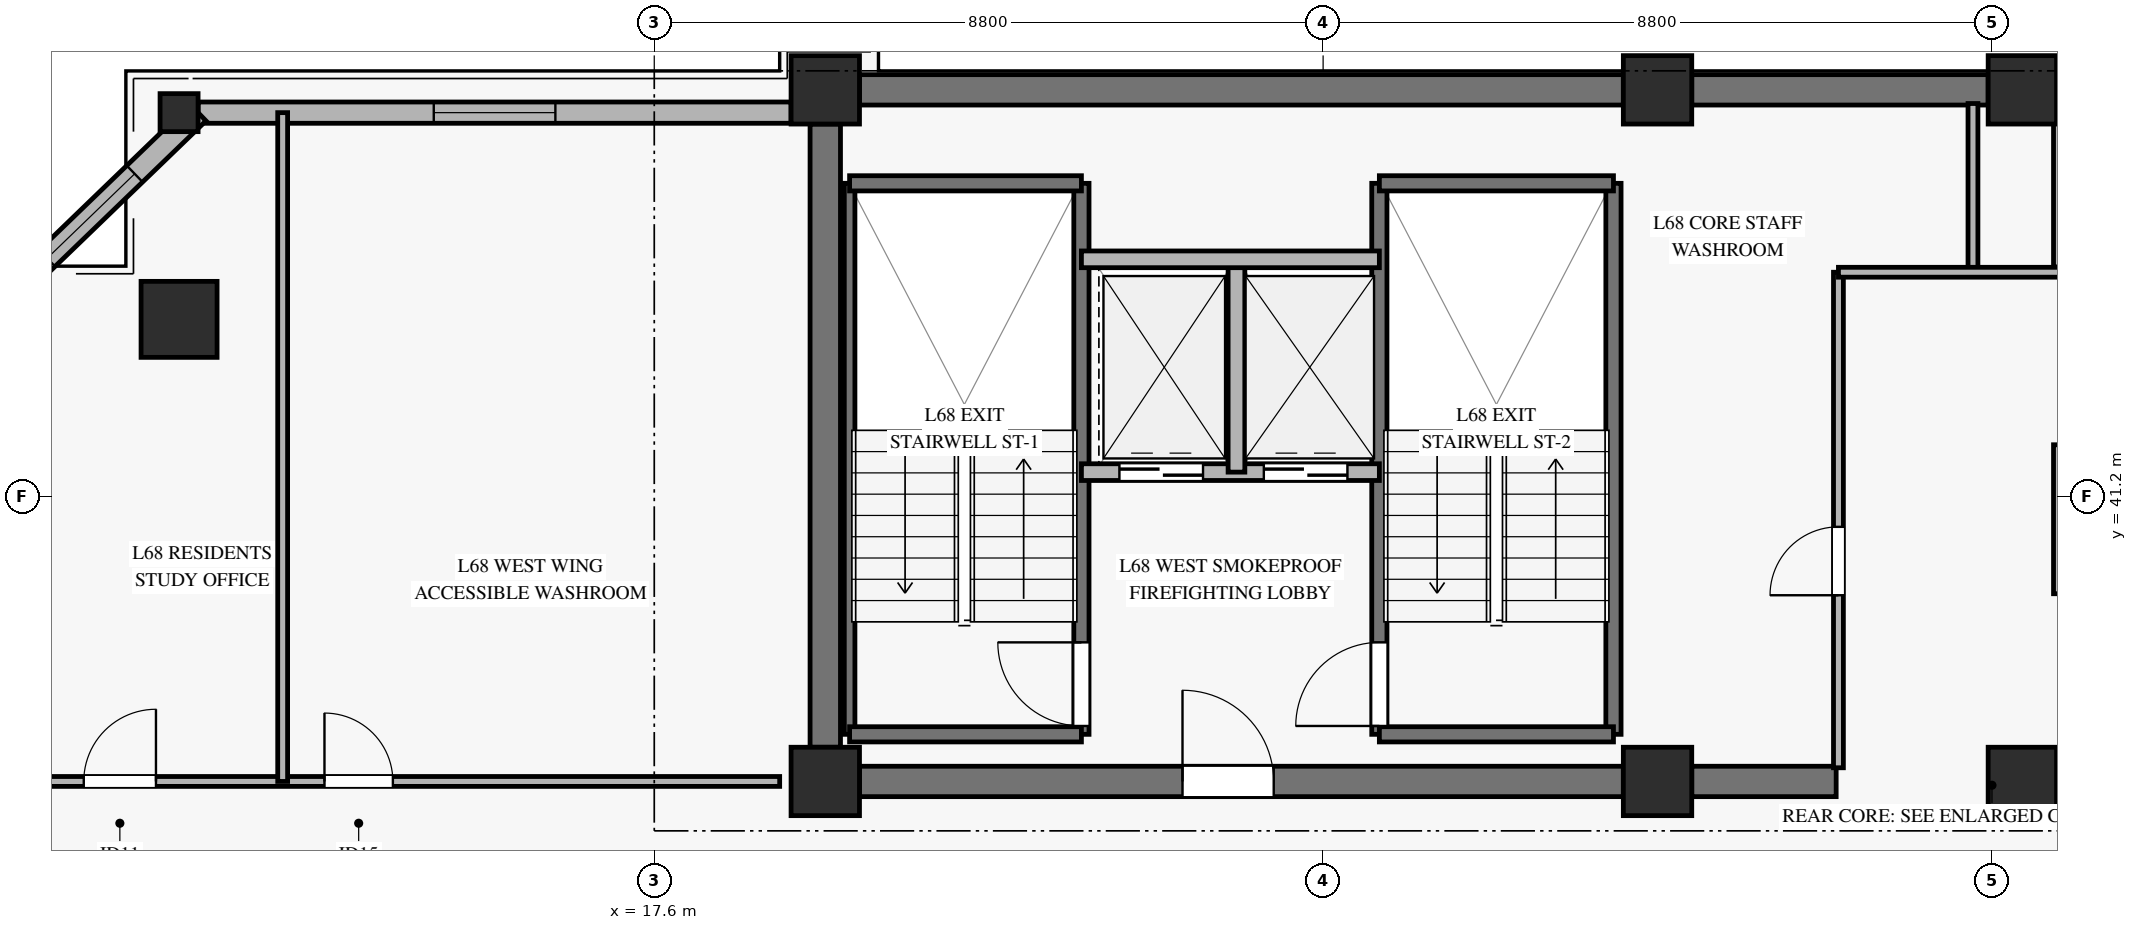
"""IFC4 building model, lengths in metres.
Left out: names, types, materials, properties, quantities, classifications, styles, units other than length and angle.
Written with IfcOpenShell. Run it as: python <this file> out.ifc"""

import sys

from ifc_helpers import new_model, si_unit, direction, frame, frame_2d, origin, origin_2d, place, context, subcontext, project, spatial, rectangle, hollow_rectangle, extrude, source, transform, mapped, element, fill, save


model = new_model("IFC4")
c1 = context("Model", 3, precision=1e-05, world=origin(), true_north=direction((0.0, 1.0)))
c2 = subcontext(c1, "Body", "Model", "MODEL_VIEW")
j1 = project(units=[si_unit("LENGTHUNIT", "METRE"), si_unit("PLANEANGLEUNIT", "RADIAN")], contexts=[c1])
p1 = place(None, origin())
s1 = spatial("IfcSite", under=j1, at=p1, CompositionType="ELEMENT")
p2 = place(p1, origin())
s2 = spatial("IfcBuilding", under=s1, at=p2, CompositionType="ELEMENT")
p3 = place(p2, frame((0.0, 0.0, 265.5)))
s3 = spatial("IfcBuildingStorey", under=s2, at=p3, CompositionType="ELEMENT", Elevation=265.5)
m1 = source(origin(), c2, "Body", "SweptSolid", [
    extrude(rectangle(XDim=0.9, YDim=0.9, at=origin_2d()), origin(), (0.0, 0.0, 1.0), 3.185),
])
for number, where, z_axis, x_axis in (
    (1, (19.85, 37.45, 0.0), (0.0, 0.0, 1.0), (1.0, 0.0, 0.0)),
    (2, (19.85, 46.55, 0.0), (0.0, 0.0, 1.0), (1.0, 0.0, 0.0)),
    (3, (30.8, 37.45, 0.0), (0.0, 0.0, 1.0), (1.0, 0.0, 0.0)),
    (4, (30.8, 46.55, 0.0), (0.0, 0.0, 1.0), (1.0, 0.0, 0.0)),
    (5, (35.6, 37.45, 0.0), (0.0, 0.0, 1.0), (1.0, 0.0, 0.0)),
    (6, (35.6, 46.55, 0.0), (0.0, 0.0, 1.0), (1.0, 0.0, 0.0)),
):
    element("IfcColumn", number, at=place(p3, frame(where, z_axis=z_axis, x_axis=x_axis)), inside=s3, PredefinedType="PILASTER", context=c2, shape_type="MappedRepresentation", body=[
        mapped(m1, transform((0.0, 0.0, 0.0), x_axis=(1.0, 0.0, 0.0), y_axis=(0.0, 1.0, 0.0), z_axis=(0.0, 0.0, 1.0), scale=1.0)),
    ])
p4 = place(p3, frame((20.3, 46.55, 0.0), z_axis=(0.0, 0.0, 1.0), x_axis=(1.0, 0.0, 0.0)))
e7 = element("IfcWall", 7, at=p4, inside=s3, PredefinedType="SHEAR", context=c2, shape_type="SweptSolid", body=[
    extrude(rectangle(XDim=10.05, YDim=0.4, at=frame_2d((5.025, 0.0))), origin(), (0.0, 0.0, 1.0), 3.185),
])
p5 = place(p3, frame((31.25, 46.55, 0.0), z_axis=(0.0, 0.0, 1.0), x_axis=(1.0, 0.0, 0.0)))
e8 = element("IfcWall", 8, at=p5, inside=s3, PredefinedType="SHEAR", context=c2, shape_type="SweptSolid", body=[
    extrude(rectangle(XDim=3.9, YDim=0.4, at=frame_2d((1.95, 0.0))), origin(), (0.0, 0.0, 1.0), 3.185),
])
p6 = place(p3, frame((36.05, 46.55, 0.0), z_axis=(0.0, 0.0, 1.0), x_axis=(1.0, 0.0, 0.0)))
e9 = element("IfcWall", 9, at=p6, inside=s3, PredefinedType="SHEAR", context=c2, shape_type="SweptSolid", body=[
    extrude(rectangle(XDim=7.8, YDim=0.4, at=frame_2d((3.9, 0.0))), origin(), (0.0, 0.0, 1.0), 3.185),
])
p7 = place(p3, frame((20.3, 37.45, 0.0), z_axis=(0.0, 0.0, 1.0), x_axis=(1.0, 0.0, 0.0)))
e10 = element("IfcWall", 10, at=p7, inside=s3, PredefinedType="SHEAR", context=c2, shape_type="SweptSolid", body=[
    extrude(rectangle(XDim=10.05, YDim=0.4, at=frame_2d((5.025, 0.0))), origin(), (0.0, 0.0, 1.0), 3.185),
])
p8 = place(p7, frame((4.25, 0.0, 0.0)))
e11 = element("IfcOpeningElement", 11, at=p8, cuts=e10, PredefinedType="OPENING", context=c2, shape_type="SweptSolid", body=[
    extrude(rectangle(XDim=1.2, YDim=2.15, at=frame_2d((0.6, 1.075))), frame((0.0, 0.21, 0.0), z_axis=(0.0, -1.0, 0.0), x_axis=(1.0, 0.0, 0.0)), (0.0, 0.0, 1.0), 0.42),
])
p9 = place(p3, frame((31.25, 37.45, 0.0), z_axis=(0.0, 0.0, 1.0), x_axis=(1.0, 0.0, 0.0)))
e12 = element("IfcWall", 12, at=p9, inside=s3, PredefinedType="SHEAR", context=c2, shape_type="SweptSolid", body=[
    extrude(rectangle(XDim=1.9, YDim=0.4, at=frame_2d((0.95, 0.0))), origin(), (0.0, 0.0, 1.0), 3.185),
])
p10 = place(p3, frame((36.05, 37.45, 0.0), z_axis=(0.0, 0.0, 1.0), x_axis=(1.0, 0.0, 0.0)))
e13 = element("IfcWall", 13, at=p10, inside=s3, PredefinedType="SHEAR", context=c2, shape_type="SweptSolid", body=[
    extrude(rectangle(XDim=7.8, YDim=0.4, at=frame_2d((3.9, 0.0))), origin(), (0.0, 0.0, 1.0), 3.185),
])
p11 = place(p3, frame((19.85, 37.9, 0.0), z_axis=(0.0, 0.0, 1.0), x_axis=(0.0, 1.0, 0.0)))
e14 = element("IfcWall", 14, at=p11, inside=s3, PredefinedType="SHEAR", context=c2, shape_type="SweptSolid", body=[
    extrude(rectangle(XDim=8.2, YDim=0.4, at=frame_2d((4.1, 0.0))), origin(), (0.0, 0.0, 1.0), 3.185),
])
m2 = source(origin(), c2, "Body", "SweptSolid", [
    extrude(hollow_rectangle(XDim=1.0, YDim=1.0, WallThickness=0.045, at=origin_2d()), origin(), (0.0, 0.0, 1.0), 3.207),
])
p12 = place(p3, frame((11.348, 43.53, 0.0), z_axis=(0.115114664391, 0.014617735161, 0.993244650557), x_axis=(-0.125972537044, 0.99203372922, 0.0)))
e15 = element("IfcColumn", 15, at=p12, inside=s3, PredefinedType="COLUMN", context=c2, shape_type="MappedRepresentation", body=[
    mapped(m2, transform((0.0, 0.0, 0.0), x_axis=(1.0, 0.0, 0.0), y_axis=(0.0, 1.0, 0.0), z_axis=(0.0, 0.0, 1.0), scale=1.0)),
])
m3 = source(origin(), c2, "Body", "SweptSolid", [
    extrude(hollow_rectangle(XDim=0.5, YDim=0.5, WallThickness=0.024, at=origin_2d()), origin(), (0.0, 0.0, 1.0), 3.206),
])
p13 = place(p3, frame((11.348, 46.25, 0.0), z_axis=(0.115126965108, 0.0, 0.993350784922), x_axis=(0.0, 1.0, 0.0)))
e16 = element("IfcColumn", 16, at=p13, inside=s3, PredefinedType="COLUMN", context=c2, shape_type="MappedRepresentation", body=[
    mapped(m3, transform((0.0, 0.0, 0.0), x_axis=(1.0, 0.0, 0.0), y_axis=(0.0, 1.0, 0.0), z_axis=(0.0, 0.0, 1.0), scale=1.0)),
])
p14 = place(p3, frame((11.598, 46.25, 0.0), z_axis=(0.0, 0.0, 1.0), x_axis=(1.0, 0.0, 0.0)))
e17 = element("IfcWall", 17, at=p14, inside=s3, PredefinedType="SOLIDWALL", context=c2, shape_type="SweptSolid", body=[
    extrude(rectangle(XDim=7.802, YDim=0.28, at=frame_2d((3.901, 0.0))), origin(), (0.0, 0.0, 1.0), 2.815),
])
p15 = place(p14, frame((3.101, 0.0, 0.45)))
e18 = element("IfcOpeningElement", 18, at=p15, cuts=e17, PredefinedType="OPENING", context=c2, shape_type="SweptSolid", body=[
    extrude(rectangle(XDim=1.6, YDim=2.0, at=frame_2d((0.8, 1.0))), frame((0.0, 0.15, 0.0), z_axis=(0.0, -1.0, 0.0), x_axis=(1.0, 0.0, 0.0)), (0.0, 0.0, 1.0), 0.3),
])
p16 = place(p3, frame((11.598, 46.25, 0.0), z_axis=(0.0, 0.0, 1.0), x_axis=(-0.719615137371, -0.694373137489, 0.0)))
e19 = element("IfcWall", 19, at=p16, inside=s3, PredefinedType="SOLIDWALL", context=c2, shape_type="SweptSolid", body=[
    extrude(rectangle(XDim=3.917, YDim=0.3, at=frame_2d((1.958, 0.0))), origin(), (0.0, 0.0, 1.0), 2.815),
])
p17 = place(p16, frame((1.159, 0.0, 0.45)))
e20 = element("IfcOpeningElement", 20, at=p17, cuts=e19, PredefinedType="OPENING", context=c2, shape_type="SweptSolid", body=[
    extrude(rectangle(XDim=1.6, YDim=2.0, at=frame_2d((0.8, 1.0))), frame((0.0, 0.16, 0.0), z_axis=(0.0, -1.0, 0.0), x_axis=(1.0, 0.0, 0.0)), (0.0, 0.0, 1.0), 0.32),
])
p18 = place(p3, frame((20.17, 38.07, 0.0), z_axis=(0.0, 0.0, 1.0), x_axis=(0.0, 1.0, 0.0)))
e21 = element("IfcWall", 21, at=p18, inside=s3, PredefinedType="SOLIDWALL", context=c2, shape_type="SweptSolid", body=[
    extrude(rectangle(XDim=7.25, YDim=0.14, at=frame_2d((3.625, 0.0))), origin(), (0.0, 0.0, 1.0), 3.4),
])
p19 = place(p3, frame((23.22, 38.07, 0.0), z_axis=(0.0, 0.0, 1.0), x_axis=(0.0, 1.0, 0.0)))
e22 = element("IfcWall", 22, at=p19, inside=s3, PredefinedType="SOLIDWALL", context=c2, shape_type="SweptSolid", body=[
    extrude(rectangle(XDim=7.25, YDim=0.2, at=frame_2d((3.625, 0.0))), origin(), (0.0, 0.0, 1.0), 3.4),
])
p20 = place(p19, frame((0.11, 0.0, 0.0)))
e23 = element("IfcOpeningElement", 23, at=p20, cuts=e22, PredefinedType="OPENING", context=c2, shape_type="SweptSolid", body=[
    extrude(rectangle(XDim=1.1, YDim=2.15, at=frame_2d((0.55, 1.075))), frame((0.0, 0.11, 0.0), z_axis=(0.0, -1.0, 0.0), x_axis=(1.0, 0.0, 0.0)), (0.0, 0.0, 1.0), 0.22),
])
for number, where, z_axis, x_axis in (
    (24, (20.17, 45.32, 0.0), (0.0, 0.0, 1.0), (1.0, 0.0, 0.0)),
    (25, (20.17, 38.07, 0.0), (0.0, 0.0, 1.0), (1.0, 0.0, 0.0)),
):
    element("IfcWall", number, at=place(p3, frame(where, z_axis=z_axis, x_axis=x_axis)), inside=s3, PredefinedType="SOLIDWALL", context=c2, shape_type="SweptSolid", body=[
        extrude(rectangle(XDim=3.05, YDim=0.2, at=frame_2d((1.525, 0.0))), origin(), (0.0, 0.0, 1.0), 3.4),
    ])
p21 = place(p3, frame((27.14, 38.07, 0.0), z_axis=(0.0, 0.0, 1.0), x_axis=(0.0, 1.0, 0.0)))
e26 = element("IfcWall", 26, at=p21, inside=s3, PredefinedType="SOLIDWALL", context=c2, shape_type="SweptSolid", body=[
    extrude(rectangle(XDim=7.25, YDim=0.2, at=frame_2d((3.625, 0.0))), origin(), (0.0, 0.0, 1.0), 3.4),
])
p22 = place(p21, frame((0.11, 0.0, 0.0)))
e27 = element("IfcOpeningElement", 27, at=p22, cuts=e26, PredefinedType="OPENING", context=c2, shape_type="SweptSolid", body=[
    extrude(rectangle(XDim=1.1, YDim=2.15, at=frame_2d((0.55, 1.075))), frame((0.0, 0.11, 0.0), z_axis=(0.0, -1.0, 0.0), x_axis=(1.0, 0.0, 0.0)), (0.0, 0.0, 1.0), 0.22),
])
p23 = place(p3, frame((30.22, 38.07, 0.0), z_axis=(0.0, 0.0, 1.0), x_axis=(0.0, 1.0, 0.0)))
e28 = element("IfcWall", 28, at=p23, inside=s3, PredefinedType="SOLIDWALL", context=c2, shape_type="SweptSolid", body=[
    extrude(rectangle(XDim=7.25, YDim=0.2, at=frame_2d((3.625, 0.0))), origin(), (0.0, 0.0, 1.0), 3.4),
])
for number, where, z_axis, x_axis in (
    (29, (27.14, 45.32, 0.0), (0.0, 0.0, 1.0), (1.0, 0.0, 0.0)),
    (30, (27.14, 38.07, 0.0), (0.0, 0.0, 1.0), (1.0, 0.0, 0.0)),
):
    element("IfcWall", number, at=place(p3, frame(where, z_axis=z_axis, x_axis=x_axis)), inside=s3, PredefinedType="SOLIDWALL", context=c2, shape_type="SweptSolid", body=[
        extrude(rectangle(XDim=3.08, YDim=0.2, at=frame_2d((1.54, 0.0))), origin(), (0.0, 0.0, 1.0), 3.4),
    ])
p24 = place(p3, frame((23.22, 41.52, 0.0), z_axis=(0.0, 0.0, 1.0), x_axis=(1.0, 0.0, 0.0)))
e31 = element("IfcWall", 31, at=p24, inside=s3, PredefinedType="SOLIDWALL", context=c2, shape_type="SweptSolid", body=[
    extrude(rectangle(XDim=3.92, YDim=0.22, at=frame_2d((1.96, 0.0))), origin(), (0.0, 0.0, 1.0), 3.185),
])
p25 = place(p24, frame((0.5, 0.0, 0.0)))
e32 = element("IfcOpeningElement", 32, at=p25, cuts=e31, PredefinedType="OPENING", context=c2, shape_type="SweptSolid", body=[
    extrude(rectangle(XDim=1.1, YDim=2.2, at=frame_2d((0.55, 1.1))), frame((0.0, 0.12, 0.0), z_axis=(0.0, -1.0, 0.0), x_axis=(1.0, 0.0, 0.0)), (0.0, 0.0, 1.0), 0.24),
])
p26 = place(p24, frame((2.4, 0.0, 0.0)))
e33 = element("IfcOpeningElement", 33, at=p26, cuts=e31, PredefinedType="OPENING", context=c2, shape_type="SweptSolid", body=[
    extrude(rectangle(XDim=1.1, YDim=2.2, at=frame_2d((0.55, 1.1))), frame((0.0, 0.12, 0.0), z_axis=(0.0, -1.0, 0.0), x_axis=(1.0, 0.0, 0.0)), (0.0, 0.0, 1.0), 0.24),
])
p27 = place(p3, frame((25.26, 41.52, 0.0), z_axis=(0.0, 0.0, 1.0), x_axis=(0.0, 1.0, 0.0)))
e34 = element("IfcWall", 34, at=p27, inside=s3, PredefinedType="SOLIDWALL", context=c2, shape_type="SweptSolid", body=[
    extrude(rectangle(XDim=2.8, YDim=0.22, at=frame_2d((1.4, 0.0))), origin(), (0.0, 0.0, 1.0), 3.185),
])
p28 = place(p3, frame((23.22, 44.32, 0.0), z_axis=(0.0, 0.0, 1.0), x_axis=(1.0, 0.0, 0.0)))
e35 = element("IfcWall", 35, at=p28, inside=s3, PredefinedType="SOLIDWALL", context=c2, shape_type="SweptSolid", body=[
    extrude(rectangle(XDim=3.92, YDim=0.22, at=frame_2d((1.96, 0.0))), origin(), (0.0, 0.0, 1.0), 3.185),
])
p29 = place(p3, frame((36.12, 39.92, 0.0), z_axis=(0.0, 0.0, 1.0), x_axis=(0.0, 1.0, 0.0)))
e36 = element("IfcWall", 36, at=p29, inside=s3, PredefinedType="SOLIDWALL", context=c2, shape_type="SweptSolid", body=[
    extrude(rectangle(XDim=1.96, YDim=0.22, at=frame_2d((0.98, 0.0))), origin(), (0.0, 0.0, 1.0), 3.185),
])
p30 = place(p3, frame((36.12, 44.22, 0.0), z_axis=(0.0, 0.0, 1.0), x_axis=(0.0, 1.0, 0.0)))
e37 = element("IfcWall", 37, at=p30, inside=s3, PredefinedType="SOLIDWALL", context=c2, shape_type="SweptSolid", body=[
    extrude(rectangle(XDim=2.15, YDim=0.22, at=frame_2d((1.075, 0.0))), origin(), (0.0, 0.0, 1.0), 3.185),
])
p31 = place(p3, frame((33.18, 37.63, 0.0), z_axis=(0.0, 0.0, 1.0), x_axis=(0.0, 1.0, 0.0)))
e38 = element("IfcWall", 38, at=p31, inside=s3, PredefinedType="PARTITIONING", context=c2, shape_type="SweptSolid", body=[
    extrude(rectangle(XDim=6.52, YDim=0.13, at=frame_2d((3.26, 0.0))), origin(), (0.0, 0.0, 1.0), 2.27),
])
p32 = place(p31, frame((2.27, 0.0, 0.0)))
e39 = element("IfcOpeningElement", 39, at=p32, cuts=e38, PredefinedType="OPENING", context=c2, shape_type="SweptSolid", body=[
    extrude(rectangle(XDim=0.9, YDim=2.1, at=frame_2d((0.45, 1.05))), frame((0.0, 0.075, 0.0), z_axis=(0.0, -1.0, 0.0), x_axis=(1.0, 0.0, 0.0)), (0.0, 0.0, 1.0), 0.15),
])
p33 = place(p3, frame((34.95, 44.15, 0.0), z_axis=(0.0, 0.0, 1.0), x_axis=(0.0, 1.0, 0.0)))
e40 = element("IfcWall", 40, at=p33, inside=s3, PredefinedType="PARTITIONING", context=c2, shape_type="SweptSolid", body=[
    extrude(rectangle(XDim=2.22, YDim=0.13, at=frame_2d((1.11, 0.0))), origin(), (0.0, 0.0, 1.0), 3.185),
])
p34 = place(p3, frame((33.18, 44.15, 0.0), z_axis=(0.0, 0.0, 1.0), x_axis=(1.0, 0.0, 0.0)))
e41 = element("IfcWall", 41, at=p34, inside=s3, PredefinedType="PARTITIONING", context=c2, shape_type="SweptSolid", body=[
    extrude(rectangle(XDim=2.94, YDim=0.13, at=frame_2d((1.47, 0.0))), origin(), (0.0, 0.0, 1.0), 2.47),
])
p35 = place(p3, frame((8.779, 37.45, 0.0), z_axis=(0.0, 0.0, 1.0), x_axis=(1.0, 0.0, 0.0)))
e42 = element("IfcWall", 42, at=p35, inside=s3, PredefinedType="PARTITIONING", context=c2, shape_type="SweptSolid", body=[
    extrude(rectangle(XDim=10.471, YDim=0.13, at=frame_2d((5.235, 0.0))), origin(), (0.0, 0.0, 1.0), 2.82),
])
p36 = place(p35, frame((1.315, 0.0, 0.0)))
e43 = element("IfcOpeningElement", 43, at=p36, cuts=e42, PredefinedType="OPENING", context=c2, shape_type="SweptSolid", body=[
    extrude(rectangle(XDim=0.95, YDim=2.1, at=frame_2d((0.475, 1.05))), frame((0.0, 0.075, 0.0), z_axis=(0.0, -1.0, 0.0), x_axis=(1.0, 0.0, 0.0)), (0.0, 0.0, 1.0), 0.15),
])
p37 = place(p35, frame((4.482, 0.0, 0.0)))
e44 = element("IfcOpeningElement", 44, at=p37, cuts=e42, PredefinedType="OPENING", context=c2, shape_type="SweptSolid", body=[
    extrude(rectangle(XDim=0.9, YDim=2.1, at=frame_2d((0.45, 1.05))), frame((0.0, 0.075, 0.0), z_axis=(0.0, -1.0, 0.0), x_axis=(1.0, 0.0, 0.0)), (0.0, 0.0, 1.0), 0.15),
])
p38 = place(p3, frame((12.711, 37.45, 0.0), z_axis=(0.0, 0.0, 1.0), x_axis=(0.0, 1.0, 0.0)))
e45 = element("IfcWall", 45, at=p38, inside=s3, PredefinedType="PARTITIONING", context=c2, shape_type="SweptSolid", body=[
    extrude(rectangle(XDim=8.8, YDim=0.13, at=frame_2d((4.4, 0.0))), origin(), (0.0, 0.0, 1.0), 3.185),
])
m4 = source(origin(), c2, "Body", "SweptSolid", [
    extrude(rectangle(XDim=1.6, YDim=2.0, at=frame_2d((0.8, 1.0))), frame((0.0, 0.03, 0.0), z_axis=(0.0, -1.0, 0.0), x_axis=(1.0, 0.0, 0.0)), (0.0, 0.0, 1.0), 0.06),
])
p39 = place(p15, origin())
e46 = element("IfcWindow", 46, at=p39, inside=s3, PartitioningType="SINGLE_PANEL", PredefinedType="WINDOW", context=c2, shape_type="MappedRepresentation", body=[
    mapped(m4, transform((0.0, 0.0, 0.0), x_axis=(1.0, 0.0, 0.0), y_axis=(0.0, 1.0, 0.0), z_axis=(0.0, 0.0, 1.0), scale=1.0)),
])
fill(e18, e46)
p40 = place(p17, origin())
e47 = element("IfcWindow", 47, at=p40, inside=s3, PartitioningType="SINGLE_PANEL", PredefinedType="WINDOW", context=c2, shape_type="MappedRepresentation", body=[
    mapped(m4, transform((0.0, 0.0, 0.0), x_axis=(1.0, 0.0, 0.0), y_axis=(0.0, 1.0, 0.0), z_axis=(0.0, 0.0, 1.0), scale=1.0)),
])
fill(e20, e47)
m5 = source(origin(), c2, "Body", "SweptSolid", [
    extrude(rectangle(XDim=1.1, YDim=2.15, at=frame_2d((0.55, 1.075))), frame((0.0, 0.025, 0.0), z_axis=(0.0, -1.0, 0.0), x_axis=(1.0, 0.0, 0.0)), (0.0, 0.0, 1.0), 0.05),
])
p41 = place(p20, origin())
e48 = element("IfcDoor", 48, at=p41, inside=s3, OperationType="SINGLE_SWING_RIGHT", PredefinedType="DOOR", context=c2, shape_type="MappedRepresentation", body=[
    mapped(m5, transform((0.0, 0.0, 0.0), x_axis=(1.0, 0.0, 0.0), y_axis=(0.0, 1.0, 0.0), z_axis=(0.0, 0.0, 1.0), scale=1.0)),
])
fill(e23, e48)
p42 = place(p22, origin())
e49 = element("IfcDoor", 49, at=p42, inside=s3, OperationType="SINGLE_SWING_LEFT", PredefinedType="DOOR", context=c2, shape_type="MappedRepresentation", body=[
    mapped(m5, transform((0.0, 0.0, 0.0), x_axis=(1.0, 0.0, 0.0), y_axis=(0.0, 1.0, 0.0), z_axis=(0.0, 0.0, 1.0), scale=1.0)),
])
fill(e27, e49)
m6 = source(origin(), c2, "Body", "SweptSolid", [
    extrude(rectangle(XDim=1.1, YDim=2.2, at=frame_2d((0.55, 1.1))), frame((0.0, 0.025, 0.0), z_axis=(0.0, -1.0, 0.0), x_axis=(1.0, 0.0, 0.0)), (0.0, 0.0, 1.0), 0.05),
])
p43 = place(p25, origin())
e50 = element("IfcDoor", 50, at=p43, inside=s3, OperationType="SLIDING_TO_LEFT", PredefinedType="DOOR", context=c2, shape_type="MappedRepresentation", body=[
    mapped(m6, transform((0.0, 0.0, 0.0), x_axis=(1.0, 0.0, 0.0), y_axis=(0.0, 1.0, 0.0), z_axis=(0.0, 0.0, 1.0), scale=1.0)),
])
fill(e32, e50)
p44 = place(p26, origin())
e51 = element("IfcDoor", 51, at=p44, inside=s3, OperationType="SLIDING_TO_LEFT", PredefinedType="DOOR", context=c2, shape_type="MappedRepresentation", body=[
    mapped(m6, transform((0.0, 0.0, 0.0), x_axis=(1.0, 0.0, 0.0), y_axis=(0.0, 1.0, 0.0), z_axis=(0.0, 0.0, 1.0), scale=1.0)),
])
fill(e33, e51)
m7 = source(origin(), c2, "Body", "SweptSolid", [
    extrude(rectangle(XDim=1.2, YDim=2.15, at=frame_2d((0.6, 1.075))), frame((0.0, 0.025, 0.0), z_axis=(0.0, -1.0, 0.0), x_axis=(1.0, 0.0, 0.0)), (0.0, 0.0, 1.0), 0.05),
])
p45 = place(p8, origin())
e52 = element("IfcDoor", 52, at=p45, inside=s3, OperationType="SINGLE_SWING_LEFT", PredefinedType="DOOR", context=c2, shape_type="MappedRepresentation", body=[
    mapped(m7, transform((0.0, 0.0, 0.0), x_axis=(1.0, 0.0, 0.0), y_axis=(0.0, 1.0, 0.0), z_axis=(0.0, 0.0, 1.0), scale=1.0)),
])
fill(e11, e52)
m8 = source(origin(), c2, "Body", "SweptSolid", [
    extrude(rectangle(XDim=0.9, YDim=2.1, at=frame_2d((0.45, 1.05))), frame((0.0, 0.025, 0.0), z_axis=(0.0, -1.0, 0.0), x_axis=(1.0, 0.0, 0.0)), (0.0, 0.0, 1.0), 0.05),
])
p46 = place(p32, origin())
e53 = element("IfcDoor", 53, at=p46, inside=s3, OperationType="SINGLE_SWING_LEFT", PredefinedType="DOOR", context=c2, shape_type="MappedRepresentation", body=[
    mapped(m8, transform((0.0, 0.0, 0.0), x_axis=(1.0, 0.0, 0.0), y_axis=(0.0, 1.0, 0.0), z_axis=(0.0, 0.0, 1.0), scale=1.0)),
])
fill(e39, e53)
m9 = source(origin(), c2, "Body", "SweptSolid", [
    extrude(rectangle(XDim=0.95, YDim=2.1, at=frame_2d((0.475, 1.05))), frame((0.0, 0.025, 0.0), z_axis=(0.0, -1.0, 0.0), x_axis=(1.0, 0.0, 0.0)), (0.0, 0.0, 1.0), 0.05),
])
p47 = place(p36, origin())
e54 = element("IfcDoor", 54, at=p47, inside=s3, OperationType="SINGLE_SWING_RIGHT", PredefinedType="DOOR", context=c2, shape_type="MappedRepresentation", body=[
    mapped(m9, transform((0.0, 0.0, 0.0), x_axis=(1.0, 0.0, 0.0), y_axis=(0.0, 1.0, 0.0), z_axis=(0.0, 0.0, 1.0), scale=1.0)),
])
fill(e43, e54)
p48 = place(p37, origin())
e55 = element("IfcDoor", 55, at=p48, inside=s3, OperationType="SINGLE_SWING_LEFT", PredefinedType="DOOR", context=c2, shape_type="MappedRepresentation", body=[
    mapped(m8, transform((0.0, 0.0, 0.0), x_axis=(1.0, 0.0, 0.0), y_axis=(0.0, 1.0, 0.0), z_axis=(0.0, 0.0, 1.0), scale=1.0)),
])
fill(e44, e55)
save(model, sys.argv[1])
